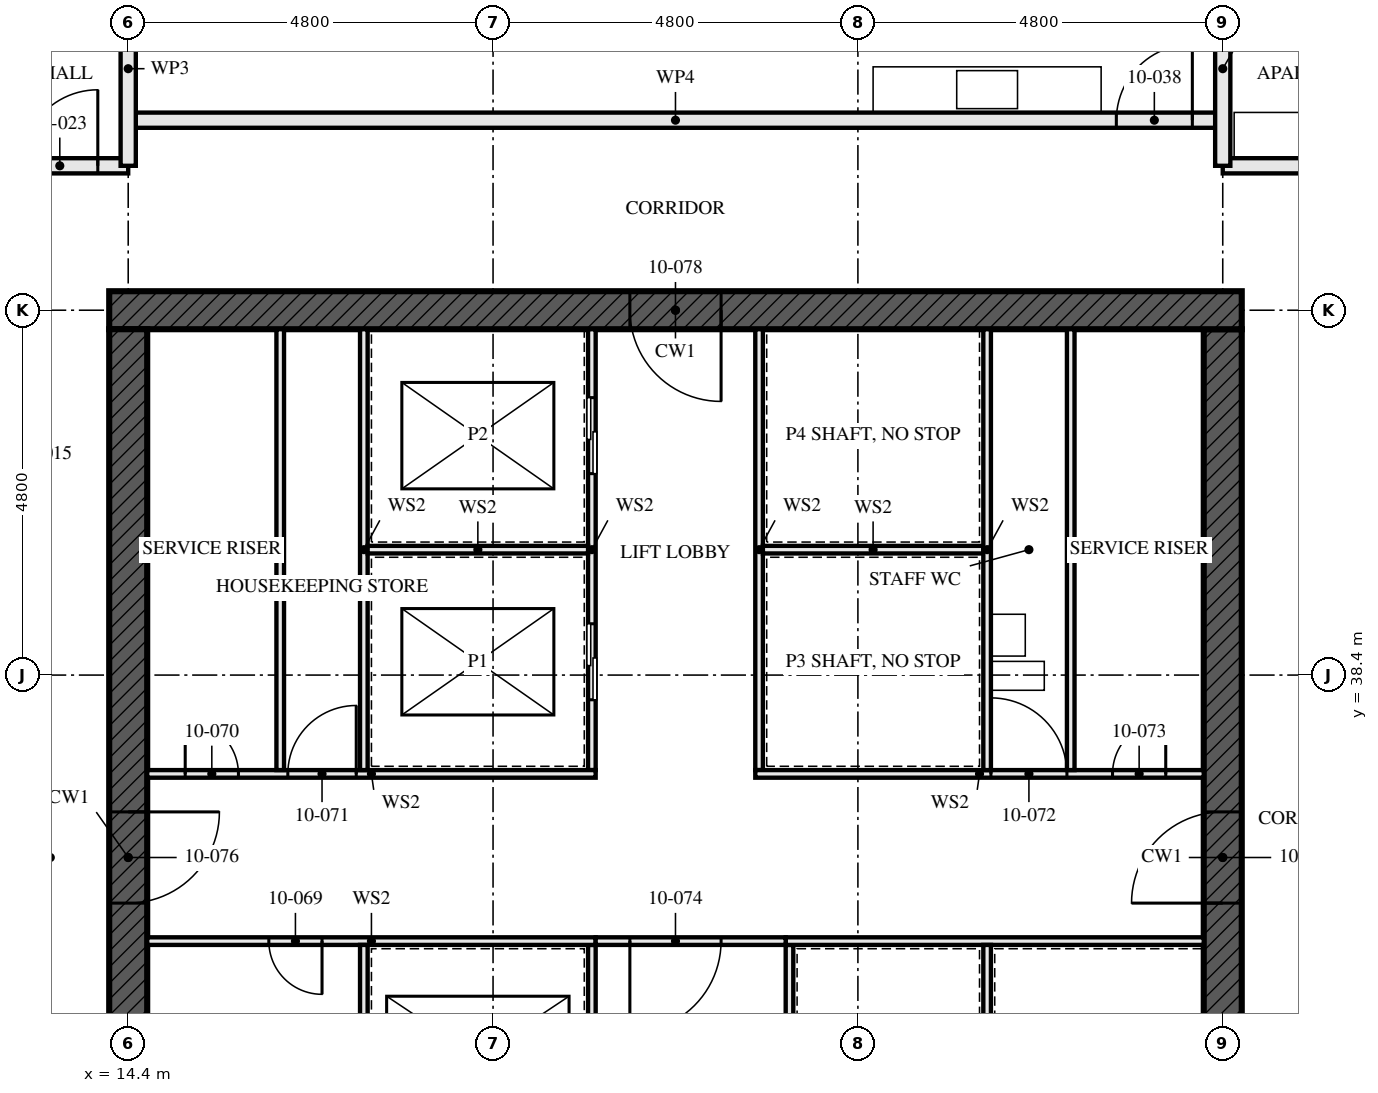
"""IFC4 building model, lengths in metres.
Left out: names, types, materials, properties, quantities, classifications, styles, units other than length and angle.
Written with IfcOpenShell. Run it as: python <this file> out.ifc"""

import sys

from ifc_helpers import new_model, si_unit, direction, frame, frame_2d, origin, place, context, subcontext, project, spatial, rectangle, extrude, element, fill, save


model = new_model("IFC4")
c1 = context("Model", 3, precision=1e-05, world=origin(), true_north=direction((0.0, 1.0)))
c2 = subcontext(c1, "Body", "Model", "MODEL_VIEW")
j1 = project(units=[si_unit("LENGTHUNIT", "METRE"), si_unit("PLANEANGLEUNIT", "RADIAN")], contexts=[c1])
p1 = place(None, origin())
s1 = spatial("IfcSite", under=j1, at=p1, CompositionType="ELEMENT")
p2 = place(p1, origin())
s2 = spatial("IfcBuilding", under=s1, at=p2, CompositionType="ELEMENT")
p3 = place(p2, frame((0.0, 0.0, 41.0)))
s3 = spatial("IfcBuildingStorey", under=s2, at=p3, CompositionType="ELEMENT", Elevation=41.0)
p4 = place(p3, frame((29.05, 43.2, -0.17), z_axis=(0.0, 0.0, 1.0), x_axis=(-1.0, 0.0, 0.0)))
e1 = element("IfcWall", 1, at=p4, inside=s3, PredefinedType="SHEAR", context=c2, shape_type="SweptSolid", body=[
    extrude(rectangle(XDim=14.9, YDim=0.5, at=frame_2d((7.45, 0.0))), origin(), (0.0, 0.0, 1.0), 3.5),
])
p5 = place(p4, frame((6.85, 0.0, 0.17)))
e2 = element("IfcOpeningElement", 2, at=p5, cuts=e1, PredefinedType="OPENING", context=c2, shape_type="SweptSolid", body=[
    extrude(rectangle(XDim=1.2, YDim=2.1, at=frame_2d((0.6, 1.05))), frame((0.0, 0.26, 0.0), z_axis=(0.0, -1.0, 0.0), x_axis=(1.0, 0.0, 0.0)), (0.0, 0.0, 1.0), 0.521),
])
p6 = place(p3, frame((14.4, 42.95, -0.17), z_axis=(0.0, 0.0, 1.0), x_axis=(0.0, -1.0, 0.0)))
e3 = element("IfcWall", 3, at=p6, inside=s3, PredefinedType="SHEAR", context=c2, shape_type="SweptSolid", body=[
    extrude(rectangle(XDim=13.9, YDim=0.5, at=frame_2d((6.95, 0.0))), origin(), (0.0, 0.0, 1.0), 3.5),
])
p7 = place(p6, frame((6.35, 0.0, 0.17)))
e4 = element("IfcOpeningElement", 4, at=p7, cuts=e3, PredefinedType="OPENING", context=c2, shape_type="SweptSolid", body=[
    extrude(rectangle(XDim=1.2, YDim=2.1, at=frame_2d((0.6, 1.05))), frame((0.0, 0.26, 0.0), z_axis=(0.0, -1.0, 0.0), x_axis=(1.0, 0.0, 0.0)), (0.0, 0.0, 1.0), 0.521),
])
p8 = place(p3, frame((28.8, 29.05, -0.17), z_axis=(0.0, 0.0, 1.0), x_axis=(0.0, 1.0, 0.0)))
e5 = element("IfcWall", 5, at=p8, inside=s3, PredefinedType="SHEAR", context=c2, shape_type="SweptSolid", body=[
    extrude(rectangle(XDim=13.9, YDim=0.5, at=frame_2d((6.95, 0.0))), origin(), (0.0, 0.0, 1.0), 3.5),
])
p9 = place(p8, frame((6.35, 0.0, 0.17)))
e6 = element("IfcOpeningElement", 6, at=p9, cuts=e5, PredefinedType="OPENING", context=c2, shape_type="SweptSolid", body=[
    extrude(rectangle(XDim=1.2, YDim=2.1, at=frame_2d((0.6, 1.05))), frame((0.0, 0.26, 0.0), z_axis=(0.0, -1.0, 0.0), x_axis=(1.0, 0.0, 0.0)), (0.0, 0.0, 1.0), 0.521),
])
p10 = place(p3, frame((14.4, 45.1, 0.0), z_axis=(0.0, 0.0, 1.0), x_axis=(-1.0, 0.0, 0.0)))
e7 = element("IfcWall", 7, at=p10, inside=s3, PredefinedType="PARTITIONING", context=c2, shape_type="SweptSolid", body=[
    extrude(rectangle(XDim=9.6, YDim=0.2, at=frame_2d((4.8, 0.0))), origin(), (0.0, 0.0, 1.0), 3.33),
])
p11 = place(p10, frame((0.4, 0.0, 0.0)))
e8 = element("IfcOpeningElement", 8, at=p11, cuts=e7, PredefinedType="OPENING", context=c2, shape_type="SweptSolid", body=[
    extrude(rectangle(XDim=1.0, YDim=2.1, at=frame_2d((0.5, 1.05))), frame((0.0, 0.111, 0.0), z_axis=(0.0, -1.0, 0.0), x_axis=(1.0, 0.0, 0.0)), (0.0, 0.0, 1.0), 0.221),
])
p12 = place(p3, frame((28.8, 45.7, 0.0), z_axis=(0.0, 0.0, 1.0), x_axis=(-1.0, 0.0, 0.0)))
e9 = element("IfcWall", 9, at=p12, inside=s3, PredefinedType="PARTITIONING", context=c2, shape_type="SweptSolid", body=[
    extrude(rectangle(XDim=14.4, YDim=0.2, at=frame_2d((7.2, 0.0))), origin(), (0.0, 0.0, 1.0), 3.33),
])
p13 = place(p12, frame((0.4, 0.0, 0.0)))
e10 = element("IfcOpeningElement", 10, at=p13, cuts=e9, PredefinedType="OPENING", context=c2, shape_type="SweptSolid", body=[
    extrude(rectangle(XDim=1.0, YDim=2.1, at=frame_2d((0.5, 1.05))), frame((0.0, 0.111, 0.0), z_axis=(0.0, -1.0, 0.0), x_axis=(1.0, 0.0, 0.0)), (0.0, 0.0, 1.0), 0.221),
])
p14 = place(p3, frame((38.4, 45.1, 0.0), z_axis=(0.0, 0.0, 1.0), x_axis=(-1.0, 0.0, 0.0)))
e11 = element("IfcWall", 11, at=p14, inside=s3, PredefinedType="PARTITIONING", context=c2, shape_type="SweptSolid", body=[
    extrude(rectangle(XDim=9.6, YDim=0.2, at=frame_2d((4.8, 0.0))), origin(), (0.0, 0.0, 1.0), 3.33),
])
p15 = place(p14, frame((0.4, 0.0, 0.0)))
e12 = element("IfcOpeningElement", 12, at=p15, cuts=e11, PredefinedType="OPENING", context=c2, shape_type="SweptSolid", body=[
    extrude(rectangle(XDim=1.0, YDim=2.1, at=frame_2d((0.5, 1.05))), frame((0.0, 0.111, 0.0), z_axis=(0.0, -1.0, 0.0), x_axis=(1.0, 0.0, 0.0)), (0.0, 0.0, 1.0), 0.221),
])
p16 = place(p14, frame((5.2, 0.0, 0.0)))
e13 = element("IfcOpeningElement", 13, at=p16, cuts=e11, PredefinedType="OPENING", context=c2, shape_type="SweptSolid", body=[
    extrude(rectangle(XDim=1.0, YDim=2.1, at=frame_2d((0.5, 1.05))), frame((0.0, 0.111, 0.0), z_axis=(0.0, -1.0, 0.0), x_axis=(1.0, 0.0, 0.0)), (0.0, 0.0, 1.0), 0.221),
])
for number, where, z_axis, x_axis in (
    (14, (16.4, 37.15, 0.0), (0.0, 0.0, 1.0), (0.0, 1.0, 0.0)),
    (15, (26.8, 37.15, 0.0), (0.0, 0.0, 1.0), (0.0, 1.0, 0.0)),
):
    element("IfcWall", number, at=place(p3, frame(where, z_axis=z_axis, x_axis=x_axis)), inside=s3, PredefinedType="SOLIDWALL", context=c2, shape_type="SweptSolid", body=[
        extrude(rectangle(XDim=5.8, YDim=0.1, at=frame_2d((2.9, 0.0))), origin(), (0.0, 0.0, 1.0), 3.33),
    ])
p17 = place(p3, frame((20.5, 29.05, 0.0), z_axis=(0.0, 0.0, 1.0), x_axis=(0.0, 1.0, 0.0)))
e16 = element("IfcWall", 16, at=p17, inside=s3, PredefinedType="SOLIDWALL", context=c2, shape_type="SweptSolid", body=[
    extrude(rectangle(XDim=5.8, YDim=0.1, at=frame_2d((2.9, 0.0))), origin(), (0.0, 0.0, 1.0), 3.33),
])
p18 = place(p17, frame((0.8, 0.0, 0.0)))
e17 = element("IfcOpeningElement", 17, at=p18, cuts=e16, PredefinedType="OPENING", context=c2, shape_type="SweptSolid", body=[
    extrude(rectangle(XDim=1.1, YDim=2.3, at=frame_2d((0.55, 1.15))), frame((0.0, 0.061, 0.0), z_axis=(0.0, -1.0, 0.0), x_axis=(1.0, 0.0, 0.0)), (0.0, 0.0, 1.0), 0.121),
])
p19 = place(p17, frame((3.775, 0.0, 0.0)))
e18 = element("IfcOpeningElement", 18, at=p19, cuts=e16, PredefinedType="OPENING", context=c2, shape_type="SweptSolid", body=[
    extrude(rectangle(XDim=1.1, YDim=2.3, at=frame_2d((0.55, 1.15))), frame((0.0, 0.061, 0.0), z_axis=(0.0, -1.0, 0.0), x_axis=(1.0, 0.0, 0.0)), (0.0, 0.0, 1.0), 0.121),
])
p20 = place(p3, frame((20.5, 37.15, 0.0), z_axis=(0.0, 0.0, 1.0), x_axis=(0.0, 1.0, 0.0)))
e19 = element("IfcWall", 19, at=p20, inside=s3, PredefinedType="SOLIDWALL", context=c2, shape_type="SweptSolid", body=[
    extrude(rectangle(XDim=5.8, YDim=0.1, at=frame_2d((2.9, 0.0))), origin(), (0.0, 0.0, 1.0), 3.33),
])
p21 = place(p20, frame((0.925, 0.0, 0.0)))
e20 = element("IfcOpeningElement", 20, at=p21, cuts=e19, PredefinedType="OPENING", context=c2, shape_type="SweptSolid", body=[
    extrude(rectangle(XDim=1.0, YDim=2.1, at=frame_2d((0.5, 1.05))), frame((0.0, 0.061, 0.0), z_axis=(0.0, -1.0, 0.0), x_axis=(1.0, 0.0, 0.0)), (0.0, 0.0, 1.0), 0.121),
])
p22 = place(p20, frame((3.9, 0.0, 0.0)))
e21 = element("IfcOpeningElement", 21, at=p22, cuts=e19, PredefinedType="OPENING", context=c2, shape_type="SweptSolid", body=[
    extrude(rectangle(XDim=1.0, YDim=2.1, at=frame_2d((0.5, 1.05))), frame((0.0, 0.061, 0.0), z_axis=(0.0, -1.0, 0.0), x_axis=(1.0, 0.0, 0.0)), (0.0, 0.0, 1.0), 0.121),
])
p23 = place(p3, frame((22.7, 37.15, 0.0), z_axis=(0.0, 0.0, 1.0), x_axis=(0.0, 1.0, 0.0)))
e22 = element("IfcWall", 22, at=p23, inside=s3, PredefinedType="SOLIDWALL", context=c2, shape_type="SweptSolid", body=[
    extrude(rectangle(XDim=5.8, YDim=0.1, at=frame_2d((2.9, 0.0))), origin(), (0.0, 0.0, 1.0), 3.33),
])
p24 = place(p3, frame((23.1, 29.05, 0.0), z_axis=(0.0, 0.0, 1.0), x_axis=(0.0, 1.0, 0.0)))
e23 = element("IfcWall", 23, at=p24, inside=s3, PredefinedType="SOLIDWALL", context=c2, shape_type="SweptSolid", body=[
    extrude(rectangle(XDim=5.8, YDim=0.1, at=frame_2d((2.9, 0.0))), origin(), (0.0, 0.0, 1.0), 3.33),
])
p25 = place(p24, frame((1.0, 0.0, 0.0)))
e24 = element("IfcOpeningElement", 24, at=p25, cuts=e23, PredefinedType="OPENING", context=c2, shape_type="SweptSolid", body=[
    extrude(rectangle(XDim=0.7, YDim=2.1, at=frame_2d((0.35, 1.05))), frame((0.0, 0.061, 0.0), z_axis=(0.0, -1.0, 0.0), x_axis=(1.0, 0.0, 0.0)), (0.0, 0.0, 1.0), 0.121),
])
p26 = place(p3, frame((14.65, 34.9, 0.0), z_axis=(0.0, 0.0, 1.0), x_axis=(1.0, 0.0, 0.0)))
e25 = element("IfcWall", 25, at=p26, inside=s3, PredefinedType="SOLIDWALL", context=c2, shape_type="SweptSolid", body=[
    extrude(rectangle(XDim=5.9, YDim=0.1, at=frame_2d((2.95, 0.0))), origin(), (0.0, 0.0, 1.0), 3.33),
])
p27 = place(p26, frame((1.6, 0.0, 0.0)))
e26 = element("IfcOpeningElement", 26, at=p27, cuts=e25, PredefinedType="OPENING", context=c2, shape_type="SweptSolid", body=[
    extrude(rectangle(XDim=0.7, YDim=2.1, at=frame_2d((0.35, 1.05))), frame((0.0, 0.061, 0.0), z_axis=(0.0, -1.0, 0.0), x_axis=(1.0, 0.0, 0.0)), (0.0, 0.0, 1.0), 0.121),
])
p28 = place(p3, frame((23.05, 34.9, 0.0), z_axis=(0.0, 0.0, 1.0), x_axis=(1.0, 0.0, 0.0)))
e27 = element("IfcWall", 27, at=p28, inside=s3, PredefinedType="SOLIDWALL", context=c2, shape_type="SweptSolid", body=[
    extrude(rectangle(XDim=5.5, YDim=0.1, at=frame_2d((2.75, 0.0))), origin(), (0.0, 0.0, 1.0), 3.33),
])
p29 = place(p3, frame((14.65, 37.1, 0.0), z_axis=(0.0, 0.0, 1.0), x_axis=(1.0, 0.0, 0.0)))
e28 = element("IfcWall", 28, at=p29, inside=s3, PredefinedType="SOLIDWALL", context=c2, shape_type="SweptSolid", body=[
    extrude(rectangle(XDim=5.9, YDim=0.1, at=frame_2d((2.95, 0.0))), origin(), (0.0, 0.0, 1.0), 3.33),
])
p30 = place(p29, frame((0.5, 0.0, 0.0)))
e29 = element("IfcOpeningElement", 29, at=p30, cuts=e28, PredefinedType="OPENING", context=c2, shape_type="SweptSolid", body=[
    extrude(rectangle(XDim=0.7, YDim=2.1, at=frame_2d((0.35, 1.05))), frame((0.0, 0.061, 0.0), z_axis=(0.0, -1.0, 0.0), x_axis=(1.0, 0.0, 0.0)), (0.0, 0.0, 1.0), 0.121),
])
p31 = place(p29, frame((1.85, 0.0, 0.0)))
e30 = element("IfcOpeningElement", 30, at=p31, cuts=e28, PredefinedType="OPENING", context=c2, shape_type="SweptSolid", body=[
    extrude(rectangle(XDim=0.9, YDim=2.1, at=frame_2d((0.45, 1.05))), frame((0.0, 0.061, 0.0), z_axis=(0.0, -1.0, 0.0), x_axis=(1.0, 0.0, 0.0)), (0.0, 0.0, 1.0), 0.121),
])
p32 = place(p3, frame((22.65, 37.1, 0.0), z_axis=(0.0, 0.0, 1.0), x_axis=(1.0, 0.0, 0.0)))
e31 = element("IfcWall", 31, at=p32, inside=s3, PredefinedType="SOLIDWALL", context=c2, shape_type="SweptSolid", body=[
    extrude(rectangle(XDim=5.9, YDim=0.1, at=frame_2d((2.95, 0.0))), origin(), (0.0, 0.0, 1.0), 3.33),
])
p33 = place(p32, frame((3.1, 0.0, 0.0)))
e32 = element("IfcOpeningElement", 32, at=p33, cuts=e31, PredefinedType="OPENING", context=c2, shape_type="SweptSolid", body=[
    extrude(rectangle(XDim=1.0, YDim=2.1, at=frame_2d((0.5, 1.05))), frame((0.0, 0.061, 0.0), z_axis=(0.0, -1.0, 0.0), x_axis=(1.0, 0.0, 0.0)), (0.0, 0.0, 1.0), 0.121),
])
p34 = place(p32, frame((4.7, 0.0, 0.0)))
e33 = element("IfcOpeningElement", 33, at=p34, cuts=e31, PredefinedType="OPENING", context=c2, shape_type="SweptSolid", body=[
    extrude(rectangle(XDim=0.7, YDim=2.1, at=frame_2d((0.35, 1.05))), frame((0.0, 0.061, 0.0), z_axis=(0.0, -1.0, 0.0), x_axis=(1.0, 0.0, 0.0)), (0.0, 0.0, 1.0), 0.121),
])
p35 = place(p3, frame((20.55, 34.9, 0.0), z_axis=(0.0, 0.0, 1.0), x_axis=(1.0, 0.0, 0.0)))
e34 = element("IfcWall", 34, at=p35, inside=s3, PredefinedType="SOLIDWALL", context=c2, shape_type="SweptSolid", body=[
    extrude(rectangle(XDim=2.5, YDim=0.1, at=frame_2d((1.25, 0.0))), origin(), (0.0, 0.0, 1.0), 3.33),
])
p36 = place(p35, frame((0.45, 0.0, 0.0)))
e35 = element("IfcOpeningElement", 35, at=p36, cuts=e34, PredefinedType="OPENING", context=c2, shape_type="SweptSolid", body=[
    extrude(rectangle(XDim=1.2, YDim=2.1, at=frame_2d((0.6, 1.05))), frame((0.0, 0.061, 0.0), z_axis=(0.0, -1.0, 0.0), x_axis=(1.0, 0.0, 0.0)), (0.0, 0.0, 1.0), 0.121),
])
for number, where, z_axis, x_axis in (
    (36, (17.5, 29.05, 0.0), (0.0, 0.0, 1.0), (0.0, 1.0, 0.0)),
    (37, (17.5, 37.15, 0.0), (0.0, 0.0, 1.0), (0.0, 1.0, 0.0)),
):
    element("IfcWall", number, at=place(p3, frame(where, z_axis=z_axis, x_axis=x_axis)), inside=s3, PredefinedType="SOLIDWALL", context=c2, shape_type="SweptSolid", body=[
        extrude(rectangle(XDim=5.8, YDim=0.1, at=frame_2d((2.9, 0.0))), origin(), (0.0, 0.0, 1.0), 3.33),
    ])
for number, where, z_axis, x_axis in (
    (38, (17.55, 40.05, 0.0), (0.0, 0.0, 1.0), (1.0, 0.0, 0.0)),
    (39, (22.75, 40.05, 0.0), (0.0, 0.0, 1.0), (1.0, 0.0, 0.0)),
):
    element("IfcWall", number, at=place(p3, frame(where, z_axis=z_axis, x_axis=x_axis)), inside=s3, PredefinedType="SOLIDWALL", context=c2, shape_type="SweptSolid", body=[
        extrude(rectangle(XDim=2.9, YDim=0.1, at=frame_2d((1.45, 0.0))), origin(), (0.0, 0.0, 1.0), 3.33),
    ])
p37 = place(p3, frame((25.7, 37.15, 0.0), z_axis=(0.0, 0.0, 1.0), x_axis=(0.0, 1.0, 0.0)))
e40 = element("IfcWall", 40, at=p37, inside=s3, PredefinedType="SOLIDWALL", context=c2, shape_type="SweptSolid", body=[
    extrude(rectangle(XDim=5.8, YDim=0.1, at=frame_2d((2.9, 0.0))), origin(), (0.0, 0.0, 1.0), 3.33),
])
p38 = place(p3, frame((25.7, 31.95, 0.0), z_axis=(0.0, 0.0, 1.0), x_axis=(0.0, 1.0, 0.0)))
e41 = element("IfcWall", 41, at=p38, inside=s3, PredefinedType="SOLIDWALL", context=c2, shape_type="SweptSolid", body=[
    extrude(rectangle(XDim=2.9, YDim=0.1, at=frame_2d((1.45, 0.0))), origin(), (0.0, 0.0, 1.0), 3.33),
])
for number, where, z_axis, x_axis in (
    (42, (14.4, 45.1, 0.0), (0.0, 0.0, 1.0), (0.0, 1.0, 0.0)),
    (43, (28.8, 45.1, 0.0), (0.0, 0.0, 1.0), (0.0, 1.0, 0.0)),
):
    element("IfcWall", number, at=place(p3, frame(where, z_axis=z_axis, x_axis=x_axis)), inside=s3, PredefinedType="PARTITIONING", context=c2, shape_type="SweptSolid", body=[
        extrude(rectangle(XDim=2.555, YDim=0.2, at=frame_2d((1.277, 0.0))), origin(), (0.0, 0.0, 1.0), 2.32),
    ])
p39 = place(p11, frame((1.0, 0.0, 0.0), z_axis=(0.0, 0.0, 1.0), x_axis=(-1.0, 0.0, 0.0)))
e44 = element("IfcDoor", 44, at=p39, inside=s3, OperationType="SINGLE_SWING_LEFT", PredefinedType="DOOR", context=c2, shape_type="SweptSolid", body=[
    extrude(rectangle(XDim=1.0, YDim=2.1, at=frame_2d((0.5, 1.05))), frame((0.0, 0.027, 0.0), z_axis=(0.0, -1.0, 0.0), x_axis=(1.0, 0.0, 0.0)), (0.0, 0.0, 1.0), 0.054),
])
fill(e8, e44)
p40 = place(p13, frame((1.0, 0.0, 0.0), z_axis=(0.0, 0.0, 1.0), x_axis=(-1.0, 0.0, 0.0)))
e45 = element("IfcDoor", 45, at=p40, inside=s3, OperationType="SINGLE_SWING_LEFT", PredefinedType="DOOR", context=c2, shape_type="SweptSolid", body=[
    extrude(rectangle(XDim=1.0, YDim=2.1, at=frame_2d((0.5, 1.05))), frame((0.0, 0.027, 0.0), z_axis=(0.0, -1.0, 0.0), x_axis=(1.0, 0.0, 0.0)), (0.0, 0.0, 1.0), 0.054),
])
fill(e10, e45)
p41 = place(p21, origin())
e46 = element("IfcDoor", 46, at=p41, inside=s3, OperationType="SLIDING_TO_LEFT", PredefinedType="DOOR", context=c2, shape_type="SweptSolid", body=[
    extrude(rectangle(XDim=1.0, YDim=2.1, at=frame_2d((0.5, 1.05))), frame((0.0, 0.05, 0.0), z_axis=(0.0, -1.0, 0.0), x_axis=(1.0, 0.0, 0.0)), (0.0, 0.0, 1.0), 0.1),
])
fill(e20, e46)
p42 = place(p22, origin())
e47 = element("IfcDoor", 47, at=p42, inside=s3, OperationType="SLIDING_TO_LEFT", PredefinedType="DOOR", context=c2, shape_type="SweptSolid", body=[
    extrude(rectangle(XDim=1.0, YDim=2.1, at=frame_2d((0.5, 1.05))), frame((0.0, 0.05, 0.0), z_axis=(0.0, -1.0, 0.0), x_axis=(1.0, 0.0, 0.0)), (0.0, 0.0, 1.0), 0.1),
])
fill(e21, e47)
p43 = place(p27, frame((0.7, 0.0, 0.0), z_axis=(0.0, 0.0, 1.0), x_axis=(-1.0, 0.0, 0.0)))
e48 = element("IfcDoor", 48, at=p43, inside=s3, OperationType="SINGLE_SWING_RIGHT", PredefinedType="DOOR", context=c2, shape_type="SweptSolid", body=[
    extrude(rectangle(XDim=0.7, YDim=2.1, at=frame_2d((0.35, 1.05))), frame((0.0, 0.027, 0.0), z_axis=(0.0, -1.0, 0.0), x_axis=(1.0, 0.0, 0.0)), (0.0, 0.0, 1.0), 0.054),
])
fill(e26, e48)
p44 = place(p30, origin())
e49 = element("IfcDoor", 49, at=p44, inside=s3, OperationType="SINGLE_SWING_RIGHT", PredefinedType="DOOR", context=c2, shape_type="SweptSolid", body=[
    extrude(rectangle(XDim=0.7, YDim=2.1, at=frame_2d((0.35, 1.05))), frame((0.0, 0.027, 0.0), z_axis=(0.0, -1.0, 0.0), x_axis=(1.0, 0.0, 0.0)), (0.0, 0.0, 1.0), 0.054),
])
fill(e29, e49)
p45 = place(p31, origin())
e50 = element("IfcDoor", 50, at=p45, inside=s3, OperationType="SINGLE_SWING_LEFT", PredefinedType="DOOR", context=c2, shape_type="SweptSolid", body=[
    extrude(rectangle(XDim=0.9, YDim=2.1, at=frame_2d((0.45, 1.05))), frame((0.0, 0.027, 0.0), z_axis=(0.0, -1.0, 0.0), x_axis=(1.0, 0.0, 0.0)), (0.0, 0.0, 1.0), 0.054),
])
fill(e30, e50)
p46 = place(p33, origin())
e51 = element("IfcDoor", 51, at=p46, inside=s3, OperationType="SINGLE_SWING_RIGHT", PredefinedType="DOOR", context=c2, shape_type="SweptSolid", body=[
    extrude(rectangle(XDim=1.0, YDim=2.1, at=frame_2d((0.5, 1.05))), frame((0.0, 0.027, 0.0), z_axis=(0.0, -1.0, 0.0), x_axis=(1.0, 0.0, 0.0)), (0.0, 0.0, 1.0), 0.054),
])
fill(e32, e51)
p47 = place(p34, origin())
e52 = element("IfcDoor", 52, at=p47, inside=s3, OperationType="SINGLE_SWING_LEFT", PredefinedType="DOOR", context=c2, shape_type="SweptSolid", body=[
    extrude(rectangle(XDim=0.7, YDim=2.1, at=frame_2d((0.35, 1.05))), frame((0.0, 0.027, 0.0), z_axis=(0.0, -1.0, 0.0), x_axis=(1.0, 0.0, 0.0)), (0.0, 0.0, 1.0), 0.054),
])
fill(e33, e52)
p48 = place(p36, frame((1.2, 0.0, 0.0), z_axis=(0.0, 0.0, 1.0), x_axis=(-1.0, 0.0, 0.0)))
e53 = element("IfcDoor", 53, at=p48, inside=s3, OperationType="SINGLE_SWING_LEFT", PredefinedType="DOOR", context=c2, shape_type="SweptSolid", body=[
    extrude(rectangle(XDim=1.2, YDim=2.1, at=frame_2d((0.6, 1.05))), frame((0.0, 0.027, 0.0), z_axis=(0.0, -1.0, 0.0), x_axis=(1.0, 0.0, 0.0)), (0.0, 0.0, 1.0), 0.054),
])
fill(e35, e53)
p49 = place(p7, origin())
e54 = element("IfcDoor", 54, at=p49, inside=s3, OperationType="SINGLE_SWING_LEFT", PredefinedType="DOOR", context=c2, shape_type="SweptSolid", body=[
    extrude(rectangle(XDim=1.2, YDim=2.1, at=frame_2d((0.6, 1.05))), frame((0.0, 0.027, 0.0), z_axis=(0.0, -1.0, 0.0), x_axis=(1.0, 0.0, 0.0)), (0.0, 0.0, 1.0), 0.054),
])
fill(e4, e54)
p50 = place(p9, origin())
e55 = element("IfcDoor", 55, at=p50, inside=s3, OperationType="SINGLE_SWING_LEFT", PredefinedType="DOOR", context=c2, shape_type="SweptSolid", body=[
    extrude(rectangle(XDim=1.2, YDim=2.1, at=frame_2d((0.6, 1.05))), frame((0.0, 0.027, 0.0), z_axis=(0.0, -1.0, 0.0), x_axis=(1.0, 0.0, 0.0)), (0.0, 0.0, 1.0), 0.054),
])
fill(e6, e55)
p51 = place(p5, origin())
e56 = element("IfcDoor", 56, at=p51, inside=s3, OperationType="SINGLE_SWING_LEFT", PredefinedType="DOOR", context=c2, shape_type="SweptSolid", body=[
    extrude(rectangle(XDim=1.2, YDim=2.1, at=frame_2d((0.6, 1.05))), frame((0.0, 0.027, 0.0), z_axis=(0.0, -1.0, 0.0), x_axis=(1.0, 0.0, 0.0)), (0.0, 0.0, 1.0), 0.054),
])
fill(e2, e56)
save(model, sys.argv[1])
